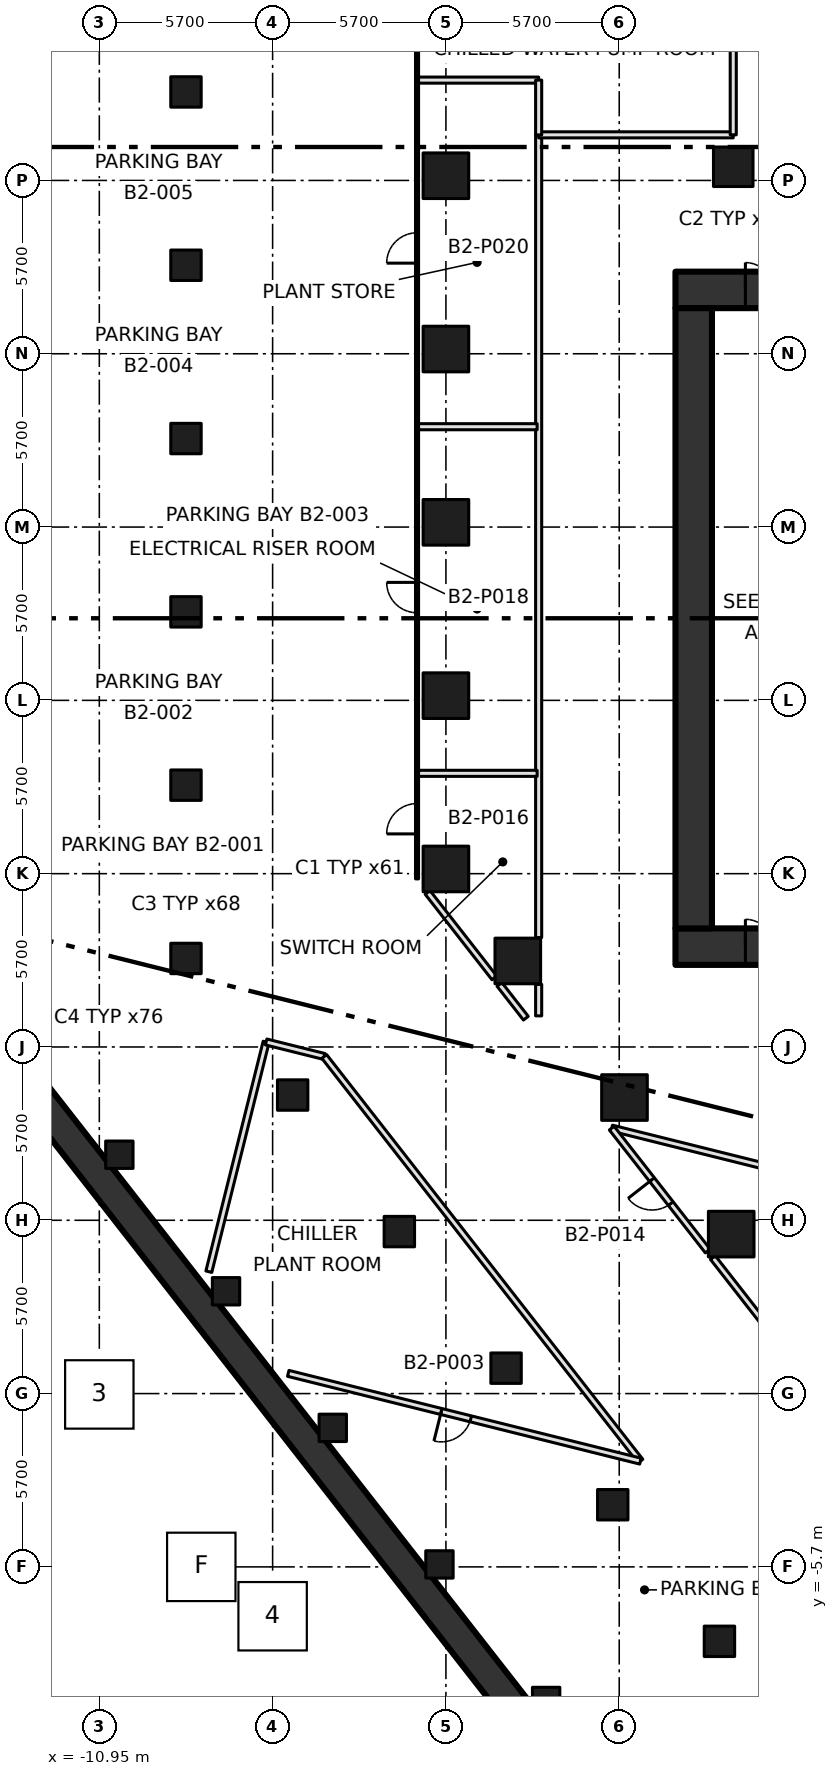
"""IFC4 building model, lengths in metres.
Left out: names, types, materials, properties, quantities, classifications, styles, units other than length and angle.
Written with IfcOpenShell. Run it as: python <this file> out.ifc"""

import sys

from ifc_helpers import new_model, si_unit, direction, frame, frame_2d, origin, origin_2d, place, context, subcontext, project, spatial, rectangle, extrude, element, fill, save


model = new_model("IFC4")
c1 = context("Model", 3, precision=1e-05, world=origin(), true_north=direction((0.0, 1.0)))
c2 = subcontext(c1, "Body", "Model", "MODEL_VIEW")
j1 = project(units=[si_unit("LENGTHUNIT", "METRE"), si_unit("PLANEANGLEUNIT", "RADIAN")], contexts=[c1])
p1 = place(None, origin())
s1 = spatial("IfcSite", under=j1, at=p1, CompositionType="ELEMENT")
p2 = place(p1, origin())
s2 = spatial("IfcBuilding", under=s1, at=p2, CompositionType="ELEMENT")
p3 = place(p2, frame((0.0, 0.0, -9.0)))
s3 = spatial("IfcBuildingStorey", under=s2, at=p3, CompositionType="ELEMENT", Elevation=-9.0)
p4 = place(p3, frame((8.202, -17.356, -0.4), z_axis=(0.0, 0.0, 1.0), x_axis=(-0.615661751898, 0.788010537524, 0.0)))
e1 = element("IfcWall", 1, at=p4, inside=s3, PredefinedType="SOLIDWALL", context=c2, shape_type="SweptSolid", body=[
    extrude(rectangle(XDim=37.452, YDim=1.0, at=frame_2d((18.726, 0.0))), origin(), (0.0, 0.0, 1.0), 4.9),
])
for number, where, z_axis, x_axis in (
    (2, (0.45, 17.255, 0.0), (0.0, 0.0, 1.0), (1.0, 0.0, 0.0)),
    (3, (0.45, 22.955, 0.0), (0.0, 0.0, 1.0), (1.0, 0.0, 0.0)),
    (4, (0.45, 28.655, 0.0), (0.0, 0.0, 1.0), (1.0, 0.0, 0.0)),
    (5, (0.45, 34.355, 0.0), (0.0, 0.0, 1.0), (1.0, 0.0, 0.0)),
    (6, (0.45, 40.055, 0.0), (0.0, 0.0, 1.0), (1.0, 0.0, 0.0)),
    (7, (9.833, 5.245, 0.0), (0.0, 0.0, 1.0), (1.0, 0.0, 0.0)),
    (8, (6.323, 9.737, 0.0), (0.0, 0.0, 1.0), (1.0, 0.0, 0.0)),
    (9, (2.814, 14.229, 0.0), (0.0, 0.0, 1.0), (1.0, 0.0, 0.0)),
):
    element("IfcColumn", number, at=place(p3, frame(where, z_axis=z_axis, x_axis=x_axis)), inside=s3, PredefinedType="COLUMN", context=c2, shape_type="SweptSolid", body=[
        extrude(rectangle(XDim=1.5, YDim=1.5, at=origin_2d()), origin(), (0.0, 0.0, 1.0), 4.5),
    ])
p5 = place(p3, frame((9.9, 40.35, 0.0), z_axis=(0.0, 0.0, 1.0), x_axis=(1.0, 0.0, 0.0)))
e10 = element("IfcColumn", 10, at=p5, inside=s3, PredefinedType="COLUMN", context=c2, shape_type="SweptSolid", body=[
    extrude(rectangle(XDim=1.3, YDim=1.3, at=origin_2d()), origin(), (0.0, 0.0, 1.0), 4.5),
])
for number, where, z_axis, x_axis in (
    (11, (-8.1, 14.311, 0.0), (0.0, 0.0, 1.0), (1.0, 0.0, 0.0)),
    (12, (-8.1, 20.011, 0.0), (0.0, 0.0, 1.0), (1.0, 0.0, 0.0)),
    (13, (-8.1, 25.711, 0.0), (0.0, 0.0, 1.0), (1.0, 0.0, 0.0)),
    (14, (-8.1, 31.411, 0.0), (0.0, 0.0, 1.0), (1.0, 0.0, 0.0)),
    (15, (-8.1, 37.111, 0.0), (0.0, 0.0, 1.0), (1.0, 0.0, 0.0)),
    (16, (-8.1, 42.811, 0.0), (0.0, 0.0, 1.0), (1.0, 0.0, 0.0)),
    (17, (-4.591, 9.819, 0.0), (0.0, 0.0, 1.0), (1.0, 0.0, 0.0)),
    (18, (-1.082, 5.328, 0.0), (0.0, 0.0, 1.0), (1.0, 0.0, 0.0)),
    (19, (2.428, 0.836, 0.0), (0.0, 0.0, 1.0), (1.0, 0.0, 0.0)),
    (20, (5.937, -3.656, 0.0), (0.0, 0.0, 1.0), (1.0, 0.0, 0.0)),
    (21, (9.446, -8.148, 0.0), (0.0, 0.0, 1.0), (1.0, 0.0, 0.0)),
):
    element("IfcColumn", number, at=place(p3, frame(where, z_axis=z_axis, x_axis=x_axis)), inside=s3, PredefinedType="COLUMN", context=c2, shape_type="SweptSolid", body=[
        extrude(rectangle(XDim=1.0, YDim=1.0, at=origin_2d()), origin(), (0.0, 0.0, 1.0), 4.5),
    ])
for number, where, z_axis, x_axis in (
    (22, (-10.291, 7.856, 0.0), (0.0, 0.0, 1.0), (1.0, 0.0, 0.0)),
    (23, (-6.782, 3.365, 0.0), (0.0, 0.0, 1.0), (1.0, 0.0, 0.0)),
    (24, (-3.272, -1.127, 0.0), (0.0, 0.0, 1.0), (1.0, 0.0, 0.0)),
    (25, (0.237, -5.619, 0.0), (0.0, 0.0, 1.0), (1.0, 0.0, 0.0)),
    (26, (3.746, -10.11, 0.0), (0.0, 0.0, 1.0), (1.0, 0.0, 0.0)),
):
    element("IfcColumn", number, at=place(p3, frame(where, z_axis=z_axis, x_axis=x_axis)), inside=s3, PredefinedType="COLUMN", context=c2, shape_type="SweptSolid", body=[
        extrude(rectangle(XDim=0.9, YDim=0.9, at=origin_2d()), origin(), (0.0, 0.0, 1.0), 4.5),
    ])
p6 = place(p3, frame((8.0, 14.7, 0.0), z_axis=(0.0, 0.0, 1.0), x_axis=(1.0, 0.0, 0.0)))
e27 = element("IfcWall", 27, at=p6, inside=s3, PredefinedType="SHEAR", context=c2, shape_type="SweptSolid", body=[
    extrude(rectangle(XDim=22.8, YDim=1.2, at=frame_2d((11.4, 0.0))), origin(), (0.0, 0.0, 1.0), 4.05),
])
p7 = place(p6, frame((2.3, 0.0, 0.0)))
e28 = element("IfcOpeningElement", 28, at=p7, cuts=e27, PredefinedType="OPENING", context=c2, shape_type="SweptSolid", body=[
    extrude(rectangle(XDim=1.8, YDim=2.1, at=frame_2d((0.9, 1.05))), frame((0.0, 0.61, 0.0), z_axis=(0.0, -1.0, 0.0), x_axis=(1.0, 0.0, 0.0)), (0.0, 0.0, 1.0), 1.22),
])
p8 = place(p3, frame((8.0, 36.3, 0.0), z_axis=(0.0, 0.0, 1.0), x_axis=(1.0, 0.0, 0.0)))
e29 = element("IfcWall", 29, at=p8, inside=s3, PredefinedType="SHEAR", context=c2, shape_type="SweptSolid", body=[
    extrude(rectangle(XDim=22.8, YDim=1.2, at=frame_2d((11.4, 0.0))), origin(), (0.0, 0.0, 1.0), 4.05),
])
p9 = place(p8, frame((2.3, 0.0, 0.0)))
e30 = element("IfcOpeningElement", 30, at=p9, cuts=e29, PredefinedType="OPENING", context=c2, shape_type="SweptSolid", body=[
    extrude(rectangle(XDim=1.8, YDim=2.1, at=frame_2d((0.9, 1.05))), frame((0.0, 0.61, 0.0), z_axis=(0.0, -1.0, 0.0), x_axis=(1.0, 0.0, 0.0)), (0.0, 0.0, 1.0), 1.22),
])
p10 = place(p3, frame((8.6, 15.3, 0.0), z_axis=(0.0, 0.0, 1.0), x_axis=(0.0, 1.0, 0.0)))
e31 = element("IfcWall", 31, at=p10, inside=s3, PredefinedType="SHEAR", context=c2, shape_type="SweptSolid", body=[
    extrude(rectangle(XDim=20.4, YDim=1.2, at=frame_2d((10.2, 0.0))), origin(), (0.0, 0.0, 1.0), 4.05),
])
p11 = place(p3, frame((-7.348, 4.009, 0.0), z_axis=(0.0, 0.0, 1.0), x_axis=(0.24190854342, 0.970299055251, 0.0)))
e32 = element("IfcWall", 32, at=p11, inside=s3, PredefinedType="PARTITIONING", context=c2, shape_type="SweptSolid", body=[
    extrude(rectangle(XDim=7.787, YDim=0.2, at=frame_2d((3.894, 0.0))), origin(), (0.0, 0.0, 1.0), 4.05),
])
p12 = place(p3, frame((-5.464, 11.565, 0.0), z_axis=(0.0, 0.0, 1.0), x_axis=(0.970258984685, -0.242069210428, 0.0)))
e33 = element("IfcWall", 33, at=p12, inside=s3, PredefinedType="PARTITIONING", context=c2, shape_type="SweptSolid", body=[
    extrude(rectangle(XDim=1.971, YDim=0.2, at=frame_2d((0.985, 0.0))), origin(), (0.0, 0.0, 1.0), 4.05),
])
p13 = place(p3, frame((-3.552, 11.088, 0.0), z_axis=(0.0, 0.0, 1.0), x_axis=(0.615667322889, -0.788006184954, 0.0)))
e34 = element("IfcWall", 34, at=p13, inside=s3, PredefinedType="PARTITIONING", context=c2, shape_type="SweptSolid", body=[
    extrude(rectangle(XDim=16.89, YDim=0.2, at=frame_2d((8.445, 0.0))), origin(), (0.0, 0.0, 1.0), 4.05),
])
p14 = place(p3, frame((-0.5, 16.928, 0.0), z_axis=(0.0, 0.0, 1.0), x_axis=(0.0, 1.0, 0.0)))
e35 = element("IfcWall", 35, at=p14, inside=s3, PredefinedType="PARTITIONING", context=c2, shape_type="SweptSolid", body=[
    extrude(rectangle(XDim=30.072, YDim=0.1, at=frame_2d((15.036, 0.0))), origin(), (0.0, 0.0, 1.0), 4.05),
])
p15 = place(p14, frame((1.48, 0.0, 0.0)))
e36 = element("IfcOpeningElement", 36, at=p15, cuts=e35, PredefinedType="OPENING", context=c2, shape_type="SweptSolid", body=[
    extrude(rectangle(XDim=1.0, YDim=2.1, at=frame_2d((0.5, 1.05))), frame((0.0, 0.06, 0.0), z_axis=(0.0, -1.0, 0.0), x_axis=(1.0, 0.0, 0.0)), (0.0, 0.0, 1.0), 0.12),
])
p16 = place(p14, frame((8.752, 0.0, 0.0)))
e37 = element("IfcOpeningElement", 37, at=p16, cuts=e35, PredefinedType="OPENING", context=c2, shape_type="SweptSolid", body=[
    extrude(rectangle(XDim=1.0, YDim=2.1, at=frame_2d((0.5, 1.05))), frame((0.0, 0.06, 0.0), z_axis=(0.0, -1.0, 0.0), x_axis=(1.0, 0.0, 0.0)), (0.0, 0.0, 1.0), 0.12),
])
p17 = place(p14, frame((20.252, 0.0, 0.0)))
e38 = element("IfcOpeningElement", 38, at=p17, cuts=e35, PredefinedType="OPENING", context=c2, shape_type="SweptSolid", body=[
    extrude(rectangle(XDim=1.0, YDim=2.1, at=frame_2d((0.5, 1.05))), frame((0.0, 0.06, 0.0), z_axis=(0.0, -1.0, 0.0), x_axis=(1.0, 0.0, 0.0)), (0.0, 0.0, 1.0), 0.12),
])
p18 = place(p3, frame((2.044, 13.672, 0.0), z_axis=(0.0, 0.0, 1.0), x_axis=(-0.615705088294, 0.787976677477, 0.0)))
e39 = element("IfcWall", 39, at=p18, inside=s3, PredefinedType="PARTITIONING", context=c2, shape_type="SweptSolid", body=[
    extrude(rectangle(XDim=3.57, YDim=0.2, at=frame_2d((1.785, 0.0))), origin(), (0.0, 0.0, 1.0), 4.05),
])
p19 = place(p3, frame((3.079, 12.347, 0.0), z_axis=(0.0, 0.0, 1.0), x_axis=(-0.61579508321, 0.787906349444, 0.0)))
e40 = element("IfcWall", 40, at=p19, inside=s3, PredefinedType="PARTITIONING", context=c2, shape_type="SweptSolid", body=[
    extrude(rectangle(XDim=1.411, YDim=0.2, at=frame_2d((0.706, 0.0))), origin(), (0.0, 0.0, 1.0), 4.05),
])
p20 = place(p3, frame((3.5, 13.459, 0.0), z_axis=(0.0, 0.0, 1.0), x_axis=(0.0, -1.0, 0.0)))
e41 = element("IfcWall", 41, at=p20, inside=s3, PredefinedType="PARTITIONING", context=c2, shape_type="SweptSolid", body=[
    extrude(rectangle(XDim=1.036, YDim=0.2, at=frame_2d((0.518, 0.0))), origin(), (0.0, 0.0, 1.0), 4.05),
])
p21 = place(p3, frame((3.5, 14.999, 0.0), z_axis=(0.0, 0.0, 1.0), x_axis=(0.0, 1.0, 0.0)))
e42 = element("IfcWall", 42, at=p21, inside=s3, PredefinedType="PARTITIONING", context=c2, shape_type="SweptSolid", body=[
    extrude(rectangle(XDim=26.401, YDim=0.2, at=frame_2d((13.2, 0.0))), origin(), (0.0, 0.0, 1.0), 4.05),
])
p22 = place(p3, frame((5.904, 8.731, 0.0), z_axis=(0.0, 0.0, 1.0), x_axis=(0.970295210336, -0.241923964912, 0.0)))
e43 = element("IfcWall", 43, at=p22, inside=s3, PredefinedType="PARTITIONING", context=c2, shape_type="SweptSolid", body=[
    extrude(rectangle(XDim=13.243, YDim=0.2, at=frame_2d((6.622, 0.0))), origin(), (0.0, 0.0, 1.0), 4.05),
])
p23 = place(p3, frame((6.847, -2.222, 0.0), z_axis=(0.0, 0.0, 1.0), x_axis=(-0.970315491491, 0.241842607851, 0.0)))
e44 = element("IfcWall", 44, at=p23, inside=s3, PredefinedType="PARTITIONING", context=c2, shape_type="SweptSolid", body=[
    extrude(rectangle(XDim=11.937, YDim=0.2, at=frame_2d((5.969, 0.0))), origin(), (0.0, 0.0, 1.0), 4.05),
])
p24 = place(p23, frame((5.75, 0.0, 0.0)))
e45 = element("IfcOpeningElement", 45, at=p24, cuts=e44, PredefinedType="OPENING", context=c2, shape_type="SweptSolid", body=[
    extrude(rectangle(XDim=1.0, YDim=2.1, at=frame_2d((0.5, 1.05))), frame((0.0, 0.11, 0.0), z_axis=(0.0, -1.0, 0.0), x_axis=(1.0, 0.0, 0.0)), (0.0, 0.0, 1.0), 0.22),
])
p25 = place(p3, frame((9.063, 4.688, 0.0), z_axis=(0.0, 0.0, 1.0), x_axis=(-0.615688364166, 0.787989745003, 0.0)))
e46 = element("IfcWall", 46, at=p25, inside=s3, PredefinedType="PARTITIONING", context=c2, shape_type="SweptSolid", body=[
    extrude(rectangle(XDim=5.131, YDim=0.2, at=frame_2d((2.565, 0.0))), origin(), (0.0, 0.0, 1.0), 4.05),
])
p26 = place(p25, frame((1.98, 0.0, 0.0)))
e47 = element("IfcOpeningElement", 47, at=p26, cuts=e46, PredefinedType="OPENING", context=c2, shape_type="SweptSolid", body=[
    extrude(rectangle(XDim=1.0, YDim=2.1, at=frame_2d((0.5, 1.05))), frame((0.0, 0.11, 0.0), z_axis=(0.0, -1.0, 0.0), x_axis=(1.0, 0.0, 0.0)), (0.0, 0.0, 1.0), 0.22),
])
p27 = place(p3, frame((9.9, 41.4, 0.0), z_axis=(0.0, 0.0, 1.0), x_axis=(-1.0, 0.0, 0.0)))
e48 = element("IfcWall", 48, at=p27, inside=s3, PredefinedType="PARTITIONING", context=c2, shape_type="SweptSolid", body=[
    extrude(rectangle(XDim=6.4, YDim=0.2, at=frame_2d((3.2, 0.0))), origin(), (0.0, 0.0, 1.0), 4.05),
])
p28 = place(p3, frame((9.9, 45.38, 0.0), z_axis=(0.0, 0.0, 1.0), x_axis=(0.0, -1.0, 0.0)))
e49 = element("IfcWall", 49, at=p28, inside=s3, PredefinedType="PARTITIONING", context=c2, shape_type="SweptSolid", body=[
    extrude(rectangle(XDim=3.98, YDim=0.2, at=frame_2d((1.99, 0.0))), origin(), (0.0, 0.0, 1.0), 4.05),
])
p29 = place(p3, frame((12.572, 0.196, 0.0), z_axis=(0.0, 0.0, 1.0), x_axis=(-0.615644914463, 0.78802369209, 0.0)))
e50 = element("IfcWall", 50, at=p29, inside=s3, PredefinedType="PARTITIONING", context=c2, shape_type="SweptSolid", body=[
    extrude(rectangle(XDim=5.43, YDim=0.2, at=frame_2d((2.715, 0.0))), origin(), (0.0, 0.0, 1.0), 4.05),
])
p30 = place(p3, frame((-0.45, 43.2, 0.0), z_axis=(0.0, 0.0, 1.0), x_axis=(1.0, 0.0, 0.0)))
e51 = element("IfcWall", 51, at=p30, inside=s3, PredefinedType="PARTITIONING", context=c2, shape_type="SweptSolid", body=[
    extrude(rectangle(XDim=3.95, YDim=0.2, at=frame_2d((1.975, 0.0))), origin(), (0.0, 0.0, 1.0), 4.05),
])
for number, where, z_axis, x_axis in (
    (52, (3.45, 20.4, 0.0), (0.0, 0.0, 1.0), (-1.0, 0.0, 0.0)),
    (53, (3.45, 31.8, 0.0), (0.0, 0.0, 1.0), (-1.0, 0.0, 0.0)),
):
    element("IfcWall", number, at=place(p3, frame(where, z_axis=z_axis, x_axis=x_axis)), inside=s3, PredefinedType="PARTITIONING", context=c2, shape_type="SweptSolid", body=[
        extrude(rectangle(XDim=3.9, YDim=0.2, at=frame_2d((1.95, 0.0))), origin(), (0.0, 0.0, 1.0), 4.05),
    ])
p31 = place(p3, frame((3.5, 43.2, 0.0), z_axis=(0.0, 0.0, 1.0), x_axis=(0.0, -1.0, 0.0)))
e54 = element("IfcWall", 54, at=p31, inside=s3, PredefinedType="PARTITIONING", context=c2, shape_type="SweptSolid", body=[
    extrude(rectangle(XDim=1.804, YDim=0.2, at=frame_2d((0.902, 0.0))), origin(), (0.0, 0.0, 1.0), 4.05),
])
p32 = place(p9, origin())
e55 = element("IfcDoor", 55, at=p32, inside=s3, OperationType="DOUBLE_DOOR_SINGLE_SWING", PredefinedType="DOOR", context=c2, shape_type="SweptSolid", body=[
    extrude(rectangle(XDim=1.8, YDim=2.1, at=frame_2d((0.9, 1.05))), frame((0.0, 0.025, 0.0), z_axis=(0.0, -1.0, 0.0), x_axis=(1.0, 0.0, 0.0)), (0.0, 0.0, 1.0), 0.05),
])
fill(e30, e55)
p33 = place(p7, origin())
e56 = element("IfcDoor", 56, at=p33, inside=s3, OperationType="DOUBLE_DOOR_SINGLE_SWING", PredefinedType="DOOR", context=c2, shape_type="SweptSolid", body=[
    extrude(rectangle(XDim=1.8, YDim=2.1, at=frame_2d((0.9, 1.05))), frame((0.0, 0.025, 0.0), z_axis=(0.0, -1.0, 0.0), x_axis=(1.0, 0.0, 0.0)), (0.0, 0.0, 1.0), 0.05),
])
fill(e28, e56)
p34 = place(p24, origin())
e57 = element("IfcDoor", 57, at=p34, inside=s3, OperationType="SINGLE_SWING_RIGHT", PredefinedType="DOOR", context=c2, shape_type="SweptSolid", body=[
    extrude(rectangle(XDim=1.0, YDim=2.1, at=frame_2d((0.5, 1.05))), frame((0.0, 0.025, 0.0), z_axis=(0.0, -1.0, 0.0), x_axis=(1.0, 0.0, 0.0)), (0.0, 0.0, 1.0), 0.05),
])
fill(e45, e57)
p35 = place(p26, origin())
e58 = element("IfcDoor", 58, at=p35, inside=s3, OperationType="SINGLE_SWING_RIGHT", PredefinedType="DOOR", context=c2, shape_type="SweptSolid", body=[
    extrude(rectangle(XDim=1.0, YDim=2.1, at=frame_2d((0.5, 1.05))), frame((0.0, 0.025, 0.0), z_axis=(0.0, -1.0, 0.0), x_axis=(1.0, 0.0, 0.0)), (0.0, 0.0, 1.0), 0.05),
])
fill(e47, e58)
p36 = place(p15, origin())
e59 = element("IfcDoor", 59, at=p36, inside=s3, OperationType="SINGLE_SWING_LEFT", PredefinedType="DOOR", context=c2, shape_type="SweptSolid", body=[
    extrude(rectangle(XDim=1.0, YDim=2.1, at=frame_2d((0.5, 1.05))), frame((0.0, 0.025, 0.0), z_axis=(0.0, -1.0, 0.0), x_axis=(1.0, 0.0, 0.0)), (0.0, 0.0, 1.0), 0.05),
])
fill(e36, e59)
p37 = place(p16, origin())
e60 = element("IfcDoor", 60, at=p37, inside=s3, OperationType="SINGLE_SWING_RIGHT", PredefinedType="DOOR", context=c2, shape_type="SweptSolid", body=[
    extrude(rectangle(XDim=1.0, YDim=2.1, at=frame_2d((0.5, 1.05))), frame((0.0, 0.025, 0.0), z_axis=(0.0, -1.0, 0.0), x_axis=(1.0, 0.0, 0.0)), (0.0, 0.0, 1.0), 0.05),
])
fill(e37, e60)
p38 = place(p17, origin())
e61 = element("IfcDoor", 61, at=p38, inside=s3, OperationType="SINGLE_SWING_LEFT", PredefinedType="DOOR", context=c2, shape_type="SweptSolid", body=[
    extrude(rectangle(XDim=1.0, YDim=2.1, at=frame_2d((0.5, 1.05))), frame((0.0, 0.025, 0.0), z_axis=(0.0, -1.0, 0.0), x_axis=(1.0, 0.0, 0.0)), (0.0, 0.0, 1.0), 0.05),
])
fill(e38, e61)
save(model, sys.argv[1])
